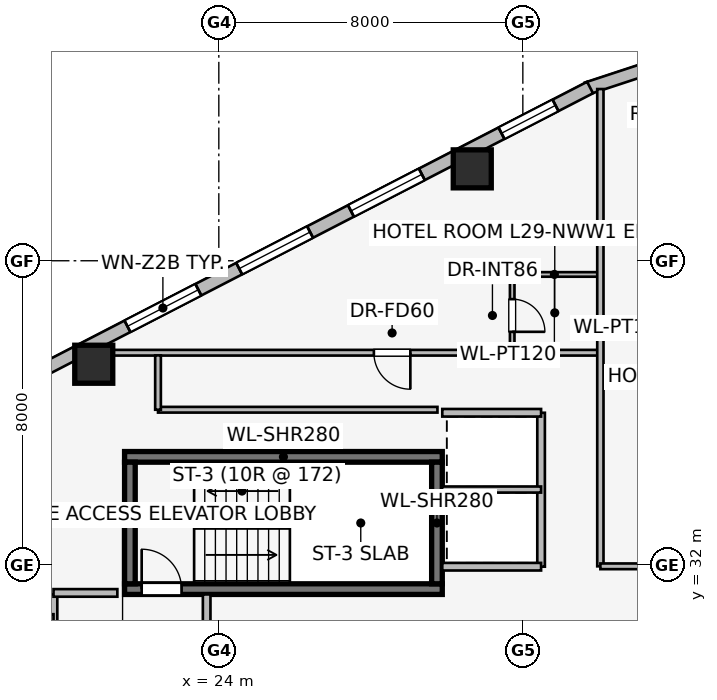
"""IFC4 building model, lengths in metres.
Left out: names, types, materials, properties, quantities, classifications, styles, units other than length and angle.
Written with IfcOpenShell. Run it as: python <this file> out.ifc"""

import sys

from ifc_helpers import new_model, si_unit, direction, frame, frame_2d, origin, origin_2d, place, context, subcontext, project, spatial, rectangle, extrude, element, fill, save


model = new_model("IFC4")
c1 = context("Model", 3, precision=1e-05, world=origin(), true_north=direction((0.0, 1.0)))
c2 = subcontext(c1, "Body", "Model", "MODEL_VIEW")
j1 = project(units=[si_unit("LENGTHUNIT", "METRE"), si_unit("PLANEANGLEUNIT", "RADIAN")], contexts=[c1])
p1 = place(None, origin())
s1 = spatial("IfcSite", under=j1, at=p1, CompositionType="ELEMENT")
p2 = place(p1, origin())
s2 = spatial("IfcBuilding", under=s1, at=p2, CompositionType="ELEMENT")
p3 = place(p2, frame((0.0, 0.0, 111.9)))
s3 = spatial("IfcBuildingStorey", under=s2, at=p3, CompositionType="ELEMENT", Elevation=111.9)
p4 = place(p3, frame((21.52, 31.36, 0.0), z_axis=(0.0, 0.0, 1.0), x_axis=(1.0, 0.0, 0.0)))
e1 = element("IfcWall", 1, at=p4, inside=s3, PredefinedType="SHEAR", context=c2, shape_type="SweptSolid", body=[
    extrude(rectangle(XDim=8.36, YDim=0.28, at=frame_2d((4.18, 0.0))), origin(), (0.0, 0.0, 1.0), 3.45),
])
p5 = place(p4, frame((0.45, 0.0, 0.0)))
e2 = element("IfcOpeningElement", 2, at=p5, cuts=e1, PredefinedType="OPENING", context=c2, shape_type="SweptSolid", body=[
    extrude(rectangle(XDim=1.05, YDim=2.0, at=frame_2d((0.525, 1.0))), frame((0.0, 0.15, 0.0), z_axis=(0.0, -1.0, 0.0), x_axis=(1.0, 0.0, 0.0)), (0.0, 0.0, 1.0), 0.3),
])
p6 = place(p3, frame((29.88, 34.84, 0.0), z_axis=(0.0, 0.0, 1.0), x_axis=(-1.0, 0.0, 0.0)))
e3 = element("IfcWall", 3, at=p6, inside=s3, PredefinedType="SHEAR", context=c2, shape_type="SweptSolid", body=[
    extrude(rectangle(XDim=8.36, YDim=0.28, at=frame_2d((4.18, 0.0))), origin(), (0.0, 0.0, 1.0), 3.45),
])
for number, where, z_axis, x_axis in (
    (4, (21.66, 34.7, 0.0), (0.0, 0.0, 1.0), (0.0, -1.0, 0.0)),
    (5, (29.74, 31.5, 0.0), (0.0, 0.0, 1.0), (0.0, 1.0, 0.0)),
):
    element("IfcWall", number, at=place(p3, frame(where, z_axis=z_axis, x_axis=x_axis)), inside=s3, PredefinedType="SHEAR", context=c2, shape_type="SweptSolid", body=[
        extrude(rectangle(XDim=3.2, YDim=0.28, at=frame_2d((1.6, 0.0))), origin(), (0.0, 0.0, 1.0), 3.45),
    ])
for number, where, z_axis, x_axis in (
    (6, (30.669, 42.418, 0.0), (0.0, 0.0, 1.0), (1.0, 0.0, 0.0)),
    (7, (20.709, 37.277, 0.0), (0.0, 0.0, 1.0), (1.0, 0.0, 0.0)),
):
    element("IfcColumn", number, at=place(p3, frame(where, z_axis=z_axis, x_axis=x_axis)), inside=s3, PredefinedType="COLUMN", context=c2, shape_type="SweptSolid", body=[
        extrude(rectangle(XDim=1.0, YDim=1.0, at=origin_2d()), origin(), (0.0, 0.0, 1.0), 3.45),
    ])
p7 = place(p3, frame((33.681, 44.532, 0.0), z_axis=(0.0, 0.0, 1.0), x_axis=(0.949937416267, 0.312440242569, 0.0)))
e8 = element("IfcWall", 8, at=p7, inside=s3, PredefinedType="STANDARD", context=c2, shape_type="SweptSolid", body=[
    extrude(rectangle(XDim=1.722, YDim=0.33, at=frame_2d((0.861, 0.0))), origin(), (0.0, 0.0, 1.0), 3.16),
])
p8 = place(p3, frame((17.169, 35.99, 0.0), z_axis=(0.0, 0.0, 1.0), x_axis=(0.888613612362, 0.458656568606, 0.0)))
e9 = element("IfcWall", 9, at=p8, inside=s3, PredefinedType="STANDARD", context=c2, shape_type="SweptSolid", body=[
    extrude(rectangle(XDim=18.681, YDim=0.34, at=frame_2d((9.34, 0.0))), origin(), (0.0, 0.0, 1.0), 3.16),
])
p9 = place(p8, frame((1.023, 0.0, 0.75)))
e10 = element("IfcOpeningElement", 10, at=p9, cuts=e9, PredefinedType="OPENING", context=c2, shape_type="SweptSolid", body=[
    extrude(rectangle(XDim=1.6, YDim=1.55, at=frame_2d((0.8, 0.775))), frame((0.0, 0.18, 0.0), z_axis=(0.0, -1.0, 0.0), x_axis=(1.0, 0.0, 0.0)), (0.0, 0.0, 1.0), 0.36),
])
p10 = place(p8, frame((4.981, 0.0, 0.75)))
e11 = element("IfcOpeningElement", 11, at=p10, cuts=e9, PredefinedType="OPENING", context=c2, shape_type="SweptSolid", body=[
    extrude(rectangle(XDim=2.1, YDim=1.5, at=frame_2d((1.05, 0.75))), frame((0.0, 0.18, 0.0), z_axis=(0.0, -1.0, 0.0), x_axis=(1.0, 0.0, 0.0)), (0.0, 0.0, 1.0), 0.36),
])
p11 = place(p8, frame((8.29, 0.0, 0.75)))
e12 = element("IfcOpeningElement", 12, at=p11, cuts=e9, PredefinedType="OPENING", context=c2, shape_type="SweptSolid", body=[
    extrude(rectangle(XDim=2.1, YDim=1.5, at=frame_2d((1.05, 0.75))), frame((0.0, 0.18, 0.0), z_axis=(0.0, -1.0, 0.0), x_axis=(1.0, 0.0, 0.0)), (0.0, 0.0, 1.0), 0.36),
])
p12 = place(p8, frame((11.6, 0.0, 0.75)))
e13 = element("IfcOpeningElement", 13, at=p12, cuts=e9, PredefinedType="OPENING", context=c2, shape_type="SweptSolid", body=[
    extrude(rectangle(XDim=2.1, YDim=1.5, at=frame_2d((1.05, 0.75))), frame((0.0, 0.18, 0.0), z_axis=(0.0, -1.0, 0.0), x_axis=(1.0, 0.0, 0.0)), (0.0, 0.0, 1.0), 0.36),
])
p13 = place(p8, frame((16.058, 0.0, 0.75)))
e14 = element("IfcOpeningElement", 14, at=p13, cuts=e9, PredefinedType="OPENING", context=c2, shape_type="SweptSolid", body=[
    extrude(rectangle(XDim=1.6, YDim=1.55, at=frame_2d((0.8, 0.775))), frame((0.0, 0.18, 0.0), z_axis=(0.0, -1.0, 0.0), x_axis=(1.0, 0.0, 0.0)), (0.0, 0.0, 1.0), 0.36),
])
p14 = place(p3, frame((19.65, 25.68, 0.0), z_axis=(0.0, 0.0, 1.0), x_axis=(0.0, 1.0, 0.0)))
e15 = element("IfcWall", 15, at=p14, inside=s3, PredefinedType="PARTITIONING", context=c2, shape_type="SweptSolid", body=[
    extrude(rectangle(XDim=5.54, YDim=0.2, at=frame_2d((2.77, 0.0))), origin(), (0.0, 0.0, 1.0), 3.16),
])
p15 = place(p14, frame((0.62, 0.0, 0.0)))
e16 = element("IfcOpeningElement", 16, at=p15, cuts=e15, PredefinedType="OPENING", context=c2, shape_type="SweptSolid", body=[
    extrude(rectangle(XDim=1.1, YDim=2.2, at=frame_2d((0.55, 1.1))), frame((0.0, 0.11, 0.0), z_axis=(0.0, -1.0, 0.0), x_axis=(1.0, 0.0, 0.0)), (0.0, 0.0, 1.0), 0.22),
])
p16 = place(p14, frame((3.12, 0.0, 0.0)))
e17 = element("IfcOpeningElement", 17, at=p16, cuts=e15, PredefinedType="OPENING", context=c2, shape_type="SweptSolid", body=[
    extrude(rectangle(XDim=1.1, YDim=2.2, at=frame_2d((0.55, 1.1))), frame((0.0, 0.11, 0.0), z_axis=(0.0, -1.0, 0.0), x_axis=(1.0, 0.0, 0.0)), (0.0, 0.0, 1.0), 0.22),
])
p17 = place(p3, frame((23.68, 25.68, 0.0), z_axis=(0.0, 0.0, 1.0), x_axis=(0.0, 1.0, 0.0)))
e18 = element("IfcWall", 18, at=p17, inside=s3, PredefinedType="PARTITIONING", context=c2, shape_type="SweptSolid", body=[
    extrude(rectangle(XDim=5.54, YDim=0.2, at=frame_2d((2.77, 0.0))), origin(), (0.0, 0.0, 1.0), 3.16),
])
p18 = place(p17, frame((1.8, 0.0, 0.0)))
e19 = element("IfcOpeningElement", 19, at=p18, cuts=e18, PredefinedType="OPENING", context=c2, shape_type="SweptSolid", body=[
    extrude(rectangle(XDim=1.05, YDim=2.0, at=frame_2d((0.525, 1.0))), frame((0.0, 0.11, 0.0), z_axis=(0.0, -1.0, 0.0), x_axis=(1.0, 0.0, 0.0)), (0.0, 0.0, 1.0), 0.22),
])
p19 = place(p3, frame((21.33, 31.26, 0.0), z_axis=(0.0, 0.0, 1.0), x_axis=(-1.0, 0.0, 0.0)))
e20 = element("IfcWall", 20, at=p19, inside=s3, PredefinedType="PARTITIONING", context=c2, shape_type="SweptSolid", body=[
    extrude(rectangle(XDim=1.68, YDim=0.2, at=frame_2d((0.84, 0.0))), origin(), (0.0, 0.0, 1.0), 3.16),
])
p20 = place(p3, frame((19.65, 30.6, 0.0), z_axis=(0.0, 0.0, 1.0), x_axis=(-1.0, 0.0, 0.0)))
e21 = element("IfcWall", 21, at=p20, inside=s3, PredefinedType="PARTITIONING", context=c2, shape_type="SweptSolid", body=[
    extrude(rectangle(XDim=2.5, YDim=0.2, at=frame_2d((1.25, 0.0))), origin(), (0.0, 0.0, 1.0), 2.06),
])
p21 = place(p3, frame((32.48, 31.95, 0.0), z_axis=(0.0, 0.0, 1.0), x_axis=(0.0, 1.0, 0.0)))
e22 = element("IfcWall", 22, at=p21, inside=s3, PredefinedType="PARTITIONING", context=c2, shape_type="SweptSolid", body=[
    extrude(rectangle(XDim=4.05, YDim=0.2, at=frame_2d((2.025, 0.0))), origin(), (0.0, 0.0, 1.0), 3.16),
])
p22 = place(p3, frame((29.88, 36.0, 0.0), z_axis=(0.0, 0.0, 1.0), x_axis=(1.0, 0.0, 0.0)))
e23 = element("IfcWall", 23, at=p22, inside=s3, PredefinedType="PARTITIONING", context=c2, shape_type="SweptSolid", body=[
    extrude(rectangle(XDim=2.6, YDim=0.2, at=frame_2d((1.3, 0.0))), origin(), (0.0, 0.0, 1.0), 2.552),
])
p23 = place(p3, frame((32.48, 31.95, 0.0), z_axis=(0.0, 0.0, 1.0), x_axis=(-1.0, 0.0, 0.0)))
e24 = element("IfcWall", 24, at=p23, inside=s3, PredefinedType="PARTITIONING", context=c2, shape_type="SweptSolid", body=[
    extrude(rectangle(XDim=2.6, YDim=0.2, at=frame_2d((1.3, 0.0))), origin(), (0.0, 0.0, 1.0), 3.16),
])
p24 = place(p3, frame((29.875, 33.98, 0.0), z_axis=(0.0, 0.0, 1.0), x_axis=(1.0, 0.0, 0.0)))
e25 = element("IfcWall", 25, at=p24, inside=s3, PredefinedType="PARTITIONING", context=c2, shape_type="SweptSolid", body=[
    extrude(rectangle(XDim=2.605, YDim=0.16, at=frame_2d((1.302, 0.0))), origin(), (0.0, 0.0, 1.0), 3.16),
])
p25 = place(p3, frame((34.0, 39.64, 0.0), z_axis=(0.0, 0.0, 1.0), x_axis=(-1.0, 0.0, 0.0)))
e26 = element("IfcWall", 26, at=p25, inside=s3, PredefinedType="PARTITIONING", context=c2, shape_type="SweptSolid", body=[
    extrude(rectangle(XDim=2.34, YDim=0.12, at=frame_2d((1.17, 0.0))), origin(), (0.0, 0.0, 1.0), 2.552),
])
p26 = place(p3, frame((31.72, 39.64, 0.0), z_axis=(0.0, 0.0, 1.0), x_axis=(0.0, -1.0, 0.0)))
e27 = element("IfcWall", 27, at=p26, inside=s3, PredefinedType="PARTITIONING", context=c2, shape_type="SweptSolid", body=[
    extrude(rectangle(XDim=2.06, YDim=0.12, at=frame_2d((1.03, 0.0))), origin(), (0.0, 0.0, 1.0), 3.16),
])
p27 = place(p26, frame((0.65, 0.0, 0.0)))
e28 = element("IfcOpeningElement", 28, at=p27, cuts=e27, PredefinedType="OPENING", context=c2, shape_type="SweptSolid", body=[
    extrude(rectangle(XDim=0.86, YDim=2.0, at=frame_2d((0.43, 1.0))), frame((0.0, 0.07, 0.0), z_axis=(0.0, -1.0, 0.0), x_axis=(1.0, 0.0, 0.0)), (0.0, 0.0, 1.0), 0.14),
])
p28 = place(p3, frame((34.0, 37.58, 0.0), z_axis=(0.0, 0.0, 1.0), x_axis=(-1.0, 0.0, 0.0)))
e29 = element("IfcWall", 29, at=p28, inside=s3, PredefinedType="PARTITIONING", context=c2, shape_type="SweptSolid", body=[
    extrude(rectangle(XDim=13.707, YDim=0.15, at=frame_2d((6.854, 0.0))), origin(), (0.0, 0.0, 1.0), 2.627),
])
p29 = place(p28, frame((4.96, 0.0, 0.0)))
e30 = element("IfcOpeningElement", 30, at=p29, cuts=e29, PredefinedType="OPENING", context=c2, shape_type="SweptSolid", body=[
    extrude(rectangle(XDim=0.96, YDim=2.0, at=frame_2d((0.48, 1.0))), frame((0.0, 0.085, 0.0), z_axis=(0.0, -1.0, 0.0), x_axis=(1.0, 0.0, 0.0)), (0.0, 0.0, 1.0), 0.17),
])
p30 = place(p3, frame((34.04, 31.96, 0.0), z_axis=(0.0, 0.0, 1.0), x_axis=(0.0, 1.0, 0.0)))
e31 = element("IfcWall", 31, at=p30, inside=s3, PredefinedType="PARTITIONING", context=c2, shape_type="SweptSolid", body=[
    extrude(rectangle(XDim=12.558, YDim=0.165, at=frame_2d((6.279, 0.0))), origin(), (0.0, 0.0, 1.0), 3.16),
])
p31 = place(p3, frame((57.208, 31.96, 0.0), z_axis=(0.0, 0.0, 1.0), x_axis=(-1.0, 0.0, 0.0)))
e32 = element("IfcWall", 32, at=p31, inside=s3, PredefinedType="PARTITIONING", context=c2, shape_type="SweptSolid", body=[
    extrude(rectangle(XDim=23.168, YDim=0.15, at=frame_2d((11.584, 0.0))), origin(), (0.0, 0.0, 1.0), 3.16),
])
p32 = place(p31, frame((11.09, 0.0, 0.0)))
e33 = element("IfcOpeningElement", 33, at=p32, cuts=e32, PredefinedType="OPENING", context=c2, shape_type="SweptSolid", body=[
    extrude(rectangle(XDim=0.96, YDim=2.0, at=frame_2d((0.48, 1.0))), frame((0.0, 0.085, 0.0), z_axis=(0.0, -1.0, 0.0), x_axis=(1.0, 0.0, 0.0)), (0.0, 0.0, 1.0), 0.17),
])
p33 = place(p3, frame((29.753, 36.08, 0.0), z_axis=(0.0, 0.0, 1.0), x_axis=(-1.0, 0.0, 0.0)))
e34 = element("IfcWall", 34, at=p33, inside=s3, PredefinedType="PARTITIONING", context=c2, shape_type="SweptSolid", body=[
    extrude(rectangle(XDim=7.353, YDim=0.15, at=frame_2d((3.677, 0.0))), origin(), (0.0, 0.0, 1.0), 2.627),
])
p34 = place(p3, frame((22.4, 36.08, 0.0), z_axis=(0.0, 0.0, 1.0), x_axis=(0.0, 1.0, 0.0)))
e35 = element("IfcWall", 35, at=p34, inside=s3, PredefinedType="PARTITIONING", context=c2, shape_type="SweptSolid", body=[
    extrude(rectangle(XDim=1.43, YDim=0.15, at=frame_2d((0.715, 0.0))), origin(), (0.0, 0.0, 1.0), 3.16),
])
p35 = place(p10, origin())
e36 = element("IfcWindow", 36, at=p35, inside=s3, PartitioningType="SINGLE_PANEL", PredefinedType="WINDOW", context=c2, shape_type="SweptSolid", body=[
    extrude(rectangle(XDim=2.1, YDim=1.5, at=frame_2d((1.05, 0.75))), frame((0.0, 0.03, 0.0), z_axis=(0.0, -1.0, 0.0), x_axis=(1.0, 0.0, 0.0)), (0.0, 0.0, 1.0), 0.06),
])
fill(e11, e36)
p36 = place(p11, origin())
e37 = element("IfcWindow", 37, at=p36, inside=s3, PartitioningType="SINGLE_PANEL", PredefinedType="WINDOW", context=c2, shape_type="SweptSolid", body=[
    extrude(rectangle(XDim=2.1, YDim=1.5, at=frame_2d((1.05, 0.75))), frame((0.0, 0.03, 0.0), z_axis=(0.0, -1.0, 0.0), x_axis=(1.0, 0.0, 0.0)), (0.0, 0.0, 1.0), 0.06),
])
fill(e12, e37)
p37 = place(p12, origin())
e38 = element("IfcWindow", 38, at=p37, inside=s3, PartitioningType="SINGLE_PANEL", PredefinedType="WINDOW", context=c2, shape_type="SweptSolid", body=[
    extrude(rectangle(XDim=2.1, YDim=1.5, at=frame_2d((1.05, 0.75))), frame((0.0, 0.03, 0.0), z_axis=(0.0, -1.0, 0.0), x_axis=(1.0, 0.0, 0.0)), (0.0, 0.0, 1.0), 0.06),
])
fill(e13, e38)
p38 = place(p13, origin())
e39 = element("IfcWindow", 39, at=p38, inside=s3, PartitioningType="SINGLE_PANEL", PredefinedType="WINDOW", context=c2, shape_type="SweptSolid", body=[
    extrude(rectangle(XDim=1.6, YDim=1.55, at=frame_2d((0.8, 0.775))), frame((0.0, 0.03, 0.0), z_axis=(0.0, -1.0, 0.0), x_axis=(1.0, 0.0, 0.0)), (0.0, 0.0, 1.0), 0.06),
])
fill(e14, e39)
p39 = place(p5, origin())
e40 = element("IfcDoor", 40, at=p39, inside=s3, OperationType="SINGLE_SWING_LEFT", PredefinedType="DOOR", context=c2, shape_type="SweptSolid", body=[
    extrude(rectangle(XDim=1.05, YDim=2.0, at=frame_2d((0.525, 1.0))), frame((0.0, 0.025, 0.0), z_axis=(0.0, -1.0, 0.0), x_axis=(1.0, 0.0, 0.0)), (0.0, 0.0, 1.0), 0.05),
])
fill(e2, e40)
p40 = place(p27, origin())
e41 = element("IfcDoor", 41, at=p40, inside=s3, OperationType="SINGLE_SWING_RIGHT", PredefinedType="DOOR", context=c2, shape_type="SweptSolid", body=[
    extrude(rectangle(XDim=0.86, YDim=2.0, at=frame_2d((0.43, 1.0))), frame((0.0, 0.025, 0.0), z_axis=(0.0, -1.0, 0.0), x_axis=(1.0, 0.0, 0.0)), (0.0, 0.0, 1.0), 0.05),
])
fill(e28, e41)
p41 = place(p29, origin())
e42 = element("IfcDoor", 42, at=p41, inside=s3, OperationType="SINGLE_SWING_LEFT", PredefinedType="DOOR", context=c2, shape_type="SweptSolid", body=[
    extrude(rectangle(XDim=0.96, YDim=2.0, at=frame_2d((0.48, 1.0))), frame((0.0, 0.025, 0.0), z_axis=(0.0, -1.0, 0.0), x_axis=(1.0, 0.0, 0.0)), (0.0, 0.0, 1.0), 0.05),
])
fill(e30, e42)
save(model, sys.argv[1])
